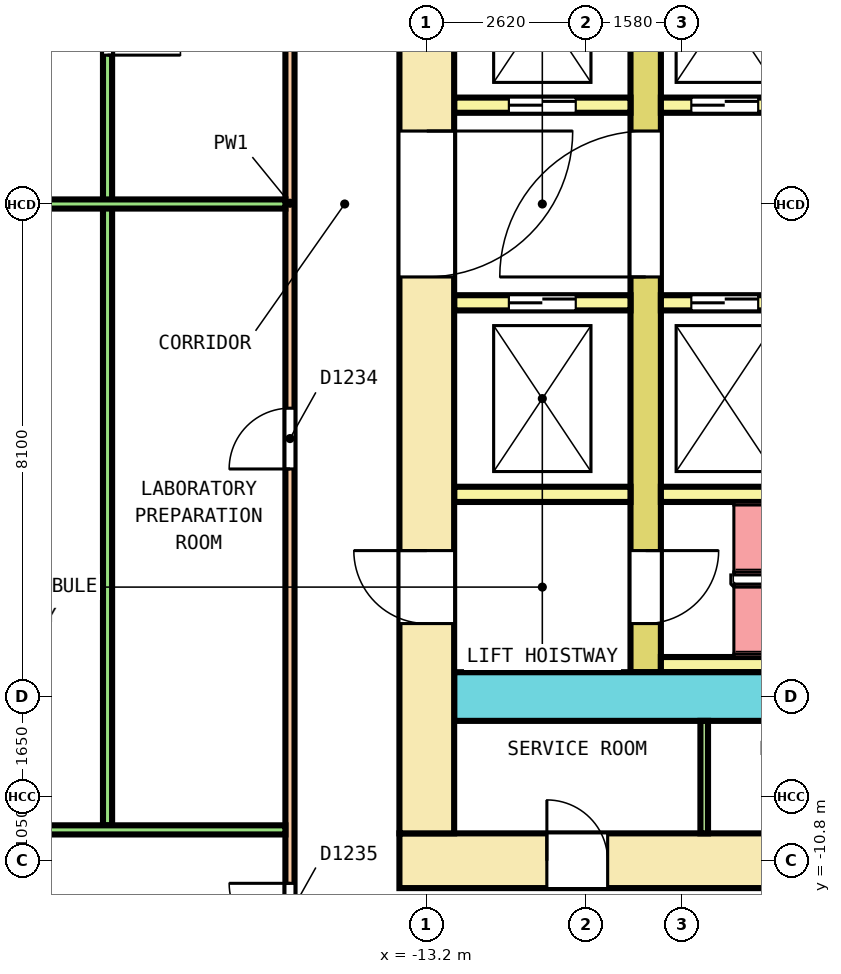
"""IFC4 building model, lengths in metres.
Left out: names, types, materials, properties, quantities, classifications, styles, units other than length and angle.
Written with IfcOpenShell. Run it as: python <this file> out.ifc"""

import sys

from ifc_helpers import new_model, si_unit, direction, frame, frame_2d, origin, place, context, subcontext, project, spatial, rectangle, extrude, element, fill, save


model = new_model("IFC4")
c1 = context("Model", 3, precision=1e-05, world=origin(), true_north=direction((0.0, 1.0)))
c2 = subcontext(c1, "Body", "Model", "MODEL_VIEW")
j1 = project(units=[si_unit("LENGTHUNIT", "METRE"), si_unit("PLANEANGLEUNIT", "RADIAN")], contexts=[c1])
p1 = place(None, origin())
s1 = spatial("IfcSite", under=j1, at=p1, CompositionType="ELEMENT")
p2 = place(p1, origin())
s2 = spatial("IfcBuilding", under=s1, at=p2, CompositionType="ELEMENT")
p3 = place(p2, frame((0.0, 0.0, 14.6)))
s3 = spatial("IfcBuildingStorey", under=s2, at=p3, CompositionType="ELEMENT", Elevation=14.6)
p4 = place(p3, frame((-13.65, -10.8, 0.0), z_axis=(0.0, 0.0, 1.0), x_axis=(1.0, 0.0, 0.0)))
e1 = element("IfcWall", 1, at=p4, inside=s3, PredefinedType="SHEAR", context=c2, shape_type="SweptSolid", body=[
    extrude(rectangle(XDim=27.3, YDim=0.9, at=frame_2d((13.65, 0.0))), origin(), (0.0, 0.0, 1.0), 4.1),
])
p5 = place(p4, frame((2.425, 0.0, 0.0)))
e2 = element("IfcOpeningElement", 2, at=p5, cuts=e1, PredefinedType="OPENING", context=c2, shape_type="SweptSolid", body=[
    extrude(rectangle(XDim=1.0, YDim=2.1, at=frame_2d((0.5, 1.05))), frame((0.0, 0.46, 0.0), z_axis=(0.0, -1.0, 0.0), x_axis=(1.0, 0.0, 0.0)), (0.0, 0.0, 1.0), 0.92),
])
p6 = place(p4, frame((6.569, 0.0, 0.0)))
e3 = element("IfcOpeningElement", 3, at=p6, cuts=e1, PredefinedType="OPENING", context=c2, shape_type="SweptSolid", body=[
    extrude(rectangle(XDim=1.0, YDim=2.1, at=frame_2d((0.5, 1.05))), frame((0.0, 0.46, 0.0), z_axis=(0.0, -1.0, 0.0), x_axis=(1.0, 0.0, 0.0)), (0.0, 0.0, 1.0), 0.92),
])
p7 = place(p4, frame((10.681, 0.0, 0.0)))
e4 = element("IfcOpeningElement", 4, at=p7, cuts=e1, PredefinedType="OPENING", context=c2, shape_type="SweptSolid", body=[
    extrude(rectangle(XDim=1.0, YDim=2.1, at=frame_2d((0.5, 1.05))), frame((0.0, 0.46, 0.0), z_axis=(0.0, -1.0, 0.0), x_axis=(1.0, 0.0, 0.0)), (0.0, 0.0, 1.0), 0.92),
])
p8 = place(p4, frame((19.202, 0.0, 0.0)))
e5 = element("IfcOpeningElement", 5, at=p8, cuts=e1, PredefinedType="OPENING", context=c2, shape_type="SweptSolid", body=[
    extrude(rectangle(XDim=1.0, YDim=2.1, at=frame_2d((0.5, 1.05))), frame((0.0, 0.46, 0.0), z_axis=(0.0, -1.0, 0.0), x_axis=(1.0, 0.0, 0.0)), (0.0, 0.0, 1.0), 0.92),
])
p9 = place(p4, frame((21.881, 0.0, 0.0)))
e6 = element("IfcOpeningElement", 6, at=p9, cuts=e1, PredefinedType="OPENING", context=c2, shape_type="SweptSolid", body=[
    extrude(rectangle(XDim=1.0, YDim=2.1, at=frame_2d((0.5, 1.05))), frame((0.0, 0.46, 0.0), z_axis=(0.0, -1.0, 0.0), x_axis=(1.0, 0.0, 0.0)), (0.0, 0.0, 1.0), 0.92),
])
p10 = place(p4, frame((24.592, 0.0, 0.0)))
e7 = element("IfcOpeningElement", 7, at=p10, cuts=e1, PredefinedType="OPENING", context=c2, shape_type="SweptSolid", body=[
    extrude(rectangle(XDim=1.0, YDim=2.1, at=frame_2d((0.5, 1.05))), frame((0.0, 0.46, 0.0), z_axis=(0.0, -1.0, 0.0), x_axis=(1.0, 0.0, 0.0)), (0.0, 0.0, 1.0), 0.92),
])
p11 = place(p4, frame((15.2, 0.0, 0.0)))
e8 = element("IfcOpeningElement", 8, at=p11, cuts=e1, PredefinedType="OPENING", context=c2, shape_type="SweptSolid", body=[
    extrude(rectangle(XDim=1.2, YDim=2.1, at=frame_2d((0.6, 1.05))), frame((0.0, 0.46, 0.0), z_axis=(0.0, -1.0, 0.0), x_axis=(1.0, 0.0, 0.0)), (0.0, 0.0, 1.0), 0.92),
])
p12 = place(p3, frame((-13.2, -10.35, 0.0), z_axis=(0.0, 0.0, 1.0), x_axis=(0.0, 1.0, 0.0)))
e9 = element("IfcWall", 9, at=p12, inside=s3, PredefinedType="SHEAR", context=c2, shape_type="SweptSolid", body=[
    extrude(rectangle(XDim=20.7, YDim=0.9, at=frame_2d((10.35, 0.0))), origin(), (0.0, 0.0, 1.0), 4.1),
])
p13 = place(p12, frame((9.15, 0.0, 0.0)))
e10 = element("IfcOpeningElement", 10, at=p13, cuts=e9, PredefinedType="OPENING", context=c2, shape_type="SweptSolid", body=[
    extrude(rectangle(XDim=2.4, YDim=2.1, at=frame_2d((1.2, 1.05))), frame((0.0, 0.46, 0.0), z_axis=(0.0, -1.0, 0.0), x_axis=(1.0, 0.0, 0.0)), (0.0, 0.0, 1.0), 0.92),
])
p14 = place(p12, frame((16.05, 0.0, 0.0)))
e11 = element("IfcOpeningElement", 11, at=p14, cuts=e9, PredefinedType="OPENING", context=c2, shape_type="SweptSolid", body=[
    extrude(rectangle(XDim=1.2, YDim=2.1, at=frame_2d((0.6, 1.05))), frame((0.0, 0.46, 0.0), z_axis=(0.0, -1.0, 0.0), x_axis=(1.0, 0.0, 0.0)), (0.0, 0.0, 1.0), 0.92),
])
p15 = place(p12, frame((3.45, 0.0, 0.0)))
e12 = element("IfcOpeningElement", 12, at=p15, cuts=e9, PredefinedType="OPENING", context=c2, shape_type="SweptSolid", body=[
    extrude(rectangle(XDim=1.2, YDim=2.1, at=frame_2d((0.6, 1.05))), frame((0.0, 0.46, 0.0), z_axis=(0.0, -1.0, 0.0), x_axis=(1.0, 0.0, 0.0)), (0.0, 0.0, 1.0), 0.92),
])
p16 = place(p3, frame((-12.75, -8.1, 0.0), z_axis=(0.0, 0.0, 1.0), x_axis=(1.0, 0.0, 0.0)))
e13 = element("IfcWall", 13, at=p16, inside=s3, PredefinedType="SHEAR", context=c2, shape_type="SweptSolid", body=[
    extrude(rectangle(XDim=25.5, YDim=0.8, at=frame_2d((12.75, 0.0))), origin(), (0.0, 0.0, 1.0), 4.1),
])
p17 = place(p16, frame((14.3, 0.0, 0.0)))
e14 = element("IfcOpeningElement", 14, at=p17, cuts=e13, PredefinedType="OPENING", context=c2, shape_type="SweptSolid", body=[
    extrude(rectangle(XDim=1.2, YDim=2.1, at=frame_2d((0.6, 1.05))), frame((0.0, 0.41, 0.0), z_axis=(0.0, -1.0, 0.0), x_axis=(1.0, 0.0, 0.0)), (0.0, 0.0, 1.0), 0.82),
])
p18 = place(p3, frame((-9.6, -7.7, 0.0), z_axis=(0.0, 0.0, 1.0), x_axis=(0.0, 1.0, 0.0)))
e15 = element("IfcWall", 15, at=p18, inside=s3, PredefinedType="SHEAR", context=c2, shape_type="SweptSolid", body=[
    extrude(rectangle(XDim=15.4, YDim=0.5, at=frame_2d((7.7, 0.0))), origin(), (0.0, 0.0, 1.0), 4.1),
])
p19 = place(p18, frame((6.5, 0.0, 0.0)))
e16 = element("IfcOpeningElement", 16, at=p19, cuts=e15, PredefinedType="OPENING", context=c2, shape_type="SweptSolid", body=[
    extrude(rectangle(XDim=2.4, YDim=2.1, at=frame_2d((1.2, 1.05))), frame((0.0, 0.26, 0.0), z_axis=(0.0, -1.0, 0.0), x_axis=(1.0, 0.0, 0.0)), (0.0, 0.0, 1.0), 0.52),
])
p20 = place(p18, frame((13.4, 0.0, 0.0)))
e17 = element("IfcOpeningElement", 17, at=p20, cuts=e15, PredefinedType="OPENING", context=c2, shape_type="SweptSolid", body=[
    extrude(rectangle(XDim=1.2, YDim=2.1, at=frame_2d((0.6, 1.05))), frame((0.0, 0.26, 0.0), z_axis=(0.0, -1.0, 0.0), x_axis=(1.0, 0.0, 0.0)), (0.0, 0.0, 1.0), 0.52),
])
p21 = place(p18, frame((0.8, 0.0, 0.0)))
e18 = element("IfcOpeningElement", 18, at=p21, cuts=e15, PredefinedType="OPENING", context=c2, shape_type="SweptSolid", body=[
    extrude(rectangle(XDim=1.2, YDim=2.1, at=frame_2d((0.6, 1.05))), frame((0.0, 0.26, 0.0), z_axis=(0.0, -1.0, 0.0), x_axis=(1.0, 0.0, 0.0)), (0.0, 0.0, 1.0), 0.52),
])
p22 = place(p3, frame((-12.75, 1.625, 0.0), z_axis=(0.0, 0.0, 1.0), x_axis=(1.0, 0.0, 0.0)))
e19 = element("IfcWall", 19, at=p22, inside=s3, PredefinedType="SOLIDWALL", context=c2, shape_type="SweptSolid", body=[
    extrude(rectangle(XDim=2.9, YDim=0.25, at=frame_2d((1.45, 0.0))), origin(), (0.0, 0.0, 1.0), 4.1),
])
p23 = place(p22, frame((0.9, 0.0, 0.0)))
e20 = element("IfcOpeningElement", 20, at=p23, cuts=e19, PredefinedType="OPENING", context=c2, shape_type="SweptSolid", body=[
    extrude(rectangle(XDim=1.1, YDim=2.1, at=frame_2d((0.55, 1.05))), frame((0.0, 0.135, 0.0), z_axis=(0.0, -1.0, 0.0), x_axis=(1.0, 0.0, 0.0)), (0.0, 0.0, 1.0), 0.27),
])
p24 = place(p3, frame((-9.35, 1.625, 0.0), z_axis=(0.0, 0.0, 1.0), x_axis=(1.0, 0.0, 0.0)))
e21 = element("IfcWall", 21, at=p24, inside=s3, PredefinedType="SOLIDWALL", context=c2, shape_type="SweptSolid", body=[
    extrude(rectangle(XDim=18.7, YDim=0.25, at=frame_2d((9.35, 0.0))), origin(), (0.0, 0.0, 1.0), 4.1),
])
p25 = place(p24, frame((0.5, 0.0, 0.0)))
e22 = element("IfcOpeningElement", 22, at=p25, cuts=e21, PredefinedType="OPENING", context=c2, shape_type="SweptSolid", body=[
    extrude(rectangle(XDim=1.1, YDim=2.1, at=frame_2d((0.55, 1.05))), frame((0.0, 0.135, 0.0), z_axis=(0.0, -1.0, 0.0), x_axis=(1.0, 0.0, 0.0)), (0.0, 0.0, 1.0), 0.27),
])
p26 = place(p24, frame((17.1, 0.0, 0.0)))
e23 = element("IfcOpeningElement", 23, at=p26, cuts=e21, PredefinedType="OPENING", context=c2, shape_type="SweptSolid", body=[
    extrude(rectangle(XDim=1.1, YDim=2.1, at=frame_2d((0.55, 1.05))), frame((0.0, 0.135, 0.0), z_axis=(0.0, -1.0, 0.0), x_axis=(1.0, 0.0, 0.0)), (0.0, 0.0, 1.0), 0.27),
])
p27 = place(p3, frame((-12.75, -1.625, 0.0), z_axis=(0.0, 0.0, 1.0), x_axis=(1.0, 0.0, 0.0)))
e24 = element("IfcWall", 24, at=p27, inside=s3, PredefinedType="SOLIDWALL", context=c2, shape_type="SweptSolid", body=[
    extrude(rectangle(XDim=2.9, YDim=0.25, at=frame_2d((1.45, 0.0))), origin(), (0.0, 0.0, 1.0), 4.1),
])
p28 = place(p27, frame((0.9, 0.0, 0.0)))
e25 = element("IfcOpeningElement", 25, at=p28, cuts=e24, PredefinedType="OPENING", context=c2, shape_type="SweptSolid", body=[
    extrude(rectangle(XDim=1.1, YDim=2.1, at=frame_2d((0.55, 1.05))), frame((0.0, 0.135, 0.0), z_axis=(0.0, -1.0, 0.0), x_axis=(1.0, 0.0, 0.0)), (0.0, 0.0, 1.0), 0.27),
])
p29 = place(p3, frame((-9.35, -1.625, 0.0), z_axis=(0.0, 0.0, 1.0), x_axis=(1.0, 0.0, 0.0)))
e26 = element("IfcWall", 26, at=p29, inside=s3, PredefinedType="SOLIDWALL", context=c2, shape_type="SweptSolid", body=[
    extrude(rectangle(XDim=18.7, YDim=0.25, at=frame_2d((9.35, 0.0))), origin(), (0.0, 0.0, 1.0), 4.1),
])
p30 = place(p29, frame((0.5, 0.0, 0.0)))
e27 = element("IfcOpeningElement", 27, at=p30, cuts=e26, PredefinedType="OPENING", context=c2, shape_type="SweptSolid", body=[
    extrude(rectangle(XDim=1.1, YDim=2.1, at=frame_2d((0.55, 1.05))), frame((0.0, 0.135, 0.0), z_axis=(0.0, -1.0, 0.0), x_axis=(1.0, 0.0, 0.0)), (0.0, 0.0, 1.0), 0.27),
])
p31 = place(p29, frame((17.1, 0.0, 0.0)))
e28 = element("IfcOpeningElement", 28, at=p31, cuts=e26, PredefinedType="OPENING", context=c2, shape_type="SweptSolid", body=[
    extrude(rectangle(XDim=1.1, YDim=2.1, at=frame_2d((0.55, 1.05))), frame((0.0, 0.135, 0.0), z_axis=(0.0, -1.0, 0.0), x_axis=(1.0, 0.0, 0.0)), (0.0, 0.0, 1.0), 0.27),
])
p32 = place(p3, frame((-12.75, -4.775, 0.0), z_axis=(0.0, 0.0, 1.0), x_axis=(1.0, 0.0, 0.0)))
e29 = element("IfcWall", 29, at=p32, inside=s3, PredefinedType="SOLIDWALL", context=c2, shape_type="SweptSolid", body=[
    extrude(rectangle(XDim=2.9, YDim=0.25, at=frame_2d((1.45, 0.0))), origin(), (0.0, 0.0, 1.0), 4.1),
])
p33 = place(p3, frame((-9.35, -4.775, 0.0), z_axis=(0.0, 0.0, 1.0), x_axis=(1.0, 0.0, 0.0)))
e30 = element("IfcWall", 30, at=p33, inside=s3, PredefinedType="SOLIDWALL", context=c2, shape_type="SweptSolid", body=[
    extrude(rectangle(XDim=18.7, YDim=0.25, at=frame_2d((9.35, 0.0))), origin(), (0.0, 0.0, 1.0), 4.1),
])
p34 = place(p3, frame((-9.35, -7.575, 0.0), z_axis=(0.0, 0.0, 1.0), x_axis=(1.0, 0.0, 0.0)))
e31 = element("IfcWall", 31, at=p34, inside=s3, PredefinedType="SOLIDWALL", context=c2, shape_type="SweptSolid", body=[
    extrude(rectangle(XDim=5.8, YDim=0.25, at=frame_2d((2.9, 0.0))), origin(), (0.0, 0.0, 1.0), 4.1),
])
p35 = place(p3, frame((-8.637, -10.35, 0.0), z_axis=(0.0, 0.0, 1.0), x_axis=(0.0, 1.0, 0.0)))
e32 = element("IfcWall", 32, at=p35, inside=s3, PredefinedType="PARTITIONING", context=c2, shape_type="SweptSolid", body=[
    extrude(rectangle(XDim=1.85, YDim=0.125, at=frame_2d((0.925, 0.0))), origin(), (0.0, 0.0, 1.0), 4.1),
])
p36 = place(p3, frame((-15.45, -12.975, 0.0), z_axis=(0.0, 0.0, 1.0), x_axis=(0.0, 1.0, 0.0)))
e33 = element("IfcWall", 33, at=p36, inside=s3, PredefinedType="PARTITIONING", context=c2, shape_type="SweptSolid", body=[
    extrude(rectangle(XDim=25.975, YDim=0.15, at=frame_2d((12.988, 0.0))), origin(), (0.0, 0.0, 1.0), 3.05),
])
p37 = place(p36, frame((24.146, 0.0, 0.0)))
e34 = element("IfcOpeningElement", 34, at=p37, cuts=e33, PredefinedType="OPENING", context=c2, shape_type="SweptSolid", body=[
    extrude(rectangle(XDim=1.0, YDim=2.1, at=frame_2d((0.5, 1.05))), frame((0.0, 0.085, 0.0), z_axis=(0.0, -1.0, 0.0), x_axis=(1.0, 0.0, 0.0)), (0.0, 0.0, 1.0), 0.17),
])
p38 = place(p36, frame((19.77, 0.0, 0.0)))
e35 = element("IfcOpeningElement", 35, at=p38, cuts=e33, PredefinedType="OPENING", context=c2, shape_type="SweptSolid", body=[
    extrude(rectangle(XDim=1.0, YDim=2.1, at=frame_2d((0.5, 1.05))), frame((0.0, 0.085, 0.0), z_axis=(0.0, -1.0, 0.0), x_axis=(1.0, 0.0, 0.0)), (0.0, 0.0, 1.0), 0.17),
])
p39 = place(p36, frame((8.617, 0.0, 0.0)))
e36 = element("IfcOpeningElement", 36, at=p39, cuts=e33, PredefinedType="OPENING", context=c2, shape_type="SweptSolid", body=[
    extrude(rectangle(XDim=1.0, YDim=2.1, at=frame_2d((0.5, 1.05))), frame((0.0, 0.085, 0.0), z_axis=(0.0, -1.0, 0.0), x_axis=(1.0, 0.0, 0.0)), (0.0, 0.0, 1.0), 0.17),
])
p40 = place(p36, frame((0.804, 0.0, 0.0)))
e37 = element("IfcOpeningElement", 37, at=p40, cuts=e33, PredefinedType="OPENING", context=c2, shape_type="SweptSolid", body=[
    extrude(rectangle(XDim=1.0, YDim=2.1, at=frame_2d((0.5, 1.05))), frame((0.0, 0.085, 0.0), z_axis=(0.0, -1.0, 0.0), x_axis=(1.0, 0.0, 0.0)), (0.0, 0.0, 1.0), 0.17),
])
p41 = place(p3, frame((-18.45, -10.218, 0.0), z_axis=(0.0, 0.0, 1.0), x_axis=(0.0, 1.0, 0.0)))
e38 = element("IfcWall", 38, at=p41, inside=s3, PredefinedType="PARTITIONING", context=c2, shape_type="SweptSolid", body=[
    extrude(rectangle(XDim=20.461, YDim=0.15, at=frame_2d((10.23, 0.0))), origin(), (0.0, 0.0, 1.0), 3.05),
])
p42 = place(p41, frame((12.666, 0.0, 0.0)))
e39 = element("IfcOpeningElement", 39, at=p42, cuts=e38, PredefinedType="OPENING", context=c2, shape_type="SweptSolid", body=[
    extrude(rectangle(XDim=1.2, YDim=2.1, at=frame_2d((0.6, 1.05))), frame((0.0, 0.085, 0.0), z_axis=(0.0, -1.0, 0.0), x_axis=(1.0, 0.0, 0.0)), (0.0, 0.0, 1.0), 0.17),
])
p43 = place(p3, frame((-25.513, 0.0, 0.0), z_axis=(0.0, 0.0, 1.0), x_axis=(1.0, 0.0, 0.0)))
e40 = element("IfcWall", 40, at=p43, inside=s3, PredefinedType="PARTITIONING", context=c2, shape_type="SweptSolid", body=[
    extrude(rectangle(XDim=9.988, YDim=0.15, at=frame_2d((4.994, 0.0))), origin(), (0.0, 0.0, 1.0), 3.05),
])
p44 = place(p43, frame((1.641, 0.0, 0.0)))
e41 = element("IfcOpeningElement", 41, at=p44, cuts=e40, PredefinedType="OPENING", context=c2, shape_type="SweptSolid", body=[
    extrude(rectangle(XDim=1.2, YDim=2.1, at=frame_2d((0.6, 1.05))), frame((0.0, 0.085, 0.0), z_axis=(0.0, -1.0, 0.0), x_axis=(1.0, 0.0, 0.0)), (0.0, 0.0, 1.0), 0.17),
])
p45 = place(p3, frame((-21.539, -10.293, 0.0), z_axis=(0.0, 0.0, 1.0), x_axis=(1.0, 0.0, 0.0)))
e42 = element("IfcWall", 42, at=p45, inside=s3, PredefinedType="PARTITIONING", context=c2, shape_type="SweptSolid", body=[
    extrude(rectangle(XDim=6.014, YDim=0.15, at=frame_2d((3.007, 0.0))), origin(), (0.0, 0.0, 1.0), 3.05),
])
p46 = place(p23, origin())
e43 = element("IfcDoor", 43, at=p46, inside=s3, OperationType="DOUBLE_DOOR_SLIDING", PredefinedType="DOOR", context=c2, shape_type="SweptSolid", body=[
    extrude(rectangle(XDim=1.1, YDim=2.1, at=frame_2d((0.55, 1.05))), frame((0.0, 0.075, 0.0), z_axis=(0.0, -1.0, 0.0), x_axis=(1.0, 0.0, 0.0)), (0.0, 0.0, 1.0), 0.15),
])
fill(e20, e43)
p47 = place(p25, origin())
e44 = element("IfcDoor", 44, at=p47, inside=s3, OperationType="DOUBLE_DOOR_SLIDING", PredefinedType="DOOR", context=c2, shape_type="SweptSolid", body=[
    extrude(rectangle(XDim=1.1, YDim=2.1, at=frame_2d((0.55, 1.05))), frame((0.0, 0.075, 0.0), z_axis=(0.0, -1.0, 0.0), x_axis=(1.0, 0.0, 0.0)), (0.0, 0.0, 1.0), 0.15),
])
fill(e22, e44)
p48 = place(p28, origin())
e45 = element("IfcDoor", 45, at=p48, inside=s3, OperationType="DOUBLE_DOOR_SLIDING", PredefinedType="DOOR", context=c2, shape_type="SweptSolid", body=[
    extrude(rectangle(XDim=1.1, YDim=2.1, at=frame_2d((0.55, 1.05))), frame((0.0, 0.075, 0.0), z_axis=(0.0, -1.0, 0.0), x_axis=(1.0, 0.0, 0.0)), (0.0, 0.0, 1.0), 0.15),
])
fill(e25, e45)
p49 = place(p30, origin())
e46 = element("IfcDoor", 46, at=p49, inside=s3, OperationType="DOUBLE_DOOR_SLIDING", PredefinedType="DOOR", context=c2, shape_type="SweptSolid", body=[
    extrude(rectangle(XDim=1.1, YDim=2.1, at=frame_2d((0.55, 1.05))), frame((0.0, 0.075, 0.0), z_axis=(0.0, -1.0, 0.0), x_axis=(1.0, 0.0, 0.0)), (0.0, 0.0, 1.0), 0.15),
])
fill(e27, e46)
p50 = place(p19, origin())
e47 = element("IfcDoor", 47, at=p50, inside=s3, OperationType="DOUBLE_DOOR_SINGLE_SWING", PredefinedType="DOOR", context=c2, shape_type="SweptSolid", body=[
    extrude(rectangle(XDim=2.4, YDim=2.1, at=frame_2d((1.2, 1.05))), frame((0.0, 0.2, 0.0), z_axis=(0.0, -1.0, 0.0), x_axis=(1.0, 0.0, 0.0)), (0.0, 0.0, 1.0), 0.4),
])
fill(e16, e47)
p51 = place(p13, origin())
e48 = element("IfcDoor", 48, at=p51, inside=s3, OperationType="DOUBLE_DOOR_SINGLE_SWING", PredefinedType="DOOR", context=c2, shape_type="SweptSolid", body=[
    extrude(rectangle(XDim=2.4, YDim=2.1, at=frame_2d((1.2, 1.05))), frame((0.0, 0.3, 0.0), z_axis=(0.0, -1.0, 0.0), x_axis=(1.0, 0.0, 0.0)), (0.0, 0.0, 1.0), 0.6),
])
fill(e10, e48)
p52 = place(p21, origin())
e49 = element("IfcDoor", 49, at=p52, inside=s3, OperationType="SINGLE_SWING_LEFT", PredefinedType="DOOR", context=c2, shape_type="SweptSolid", body=[
    extrude(rectangle(XDim=1.2, YDim=2.1, at=frame_2d((0.6, 1.05))), frame((0.0, 0.2, 0.0), z_axis=(0.0, -1.0, 0.0), x_axis=(1.0, 0.0, 0.0)), (0.0, 0.0, 1.0), 0.4),
])
fill(e18, e49)
p53 = place(p15, origin())
e50 = element("IfcDoor", 50, at=p53, inside=s3, OperationType="SINGLE_SWING_RIGHT", PredefinedType="DOOR", context=c2, shape_type="SweptSolid", body=[
    extrude(rectangle(XDim=1.2, YDim=2.1, at=frame_2d((0.6, 1.05))), frame((0.0, 0.3, 0.0), z_axis=(0.0, -1.0, 0.0), x_axis=(1.0, 0.0, 0.0)), (0.0, 0.0, 1.0), 0.6),
])
fill(e12, e50)
p54 = place(p5, origin())
e51 = element("IfcDoor", 51, at=p54, inside=s3, OperationType="SINGLE_SWING_LEFT", PredefinedType="DOOR", context=c2, shape_type="SweptSolid", body=[
    extrude(rectangle(XDim=1.0, YDim=2.1, at=frame_2d((0.5, 1.05))), frame((0.0, 0.3, 0.0), z_axis=(0.0, -1.0, 0.0), x_axis=(1.0, 0.0, 0.0)), (0.0, 0.0, 1.0), 0.6),
])
fill(e2, e51)
p55 = place(p42, origin())
e52 = element("IfcDoor", 52, at=p55, inside=s3, OperationType="DOUBLE_DOOR_SINGLE_SWING", PredefinedType="DOOR", context=c2, shape_type="SweptSolid", body=[
    extrude(rectangle(XDim=1.2, YDim=2.1, at=frame_2d((0.6, 1.05))), frame((0.0, 0.025, 0.0), z_axis=(0.0, -1.0, 0.0), x_axis=(1.0, 0.0, 0.0)), (0.0, 0.0, 1.0), 0.05),
])
fill(e39, e52)
p56 = place(p39, origin())
e53 = element("IfcDoor", 53, at=p56, inside=s3, OperationType="SINGLE_SWING_RIGHT", PredefinedType="DOOR", context=c2, shape_type="SweptSolid", body=[
    extrude(rectangle(XDim=1.0, YDim=2.1, at=frame_2d((0.5, 1.05))), frame((0.0, 0.025, 0.0), z_axis=(0.0, -1.0, 0.0), x_axis=(1.0, 0.0, 0.0)), (0.0, 0.0, 1.0), 0.05),
])
fill(e36, e53)
p57 = place(p40, origin())
e54 = element("IfcDoor", 54, at=p57, inside=s3, OperationType="SINGLE_SWING_RIGHT", PredefinedType="DOOR", context=c2, shape_type="SweptSolid", body=[
    extrude(rectangle(XDim=1.0, YDim=2.1, at=frame_2d((0.5, 1.05))), frame((0.0, 0.025, 0.0), z_axis=(0.0, -1.0, 0.0), x_axis=(1.0, 0.0, 0.0)), (0.0, 0.0, 1.0), 0.05),
])
fill(e37, e54)
save(model, sys.argv[1])
